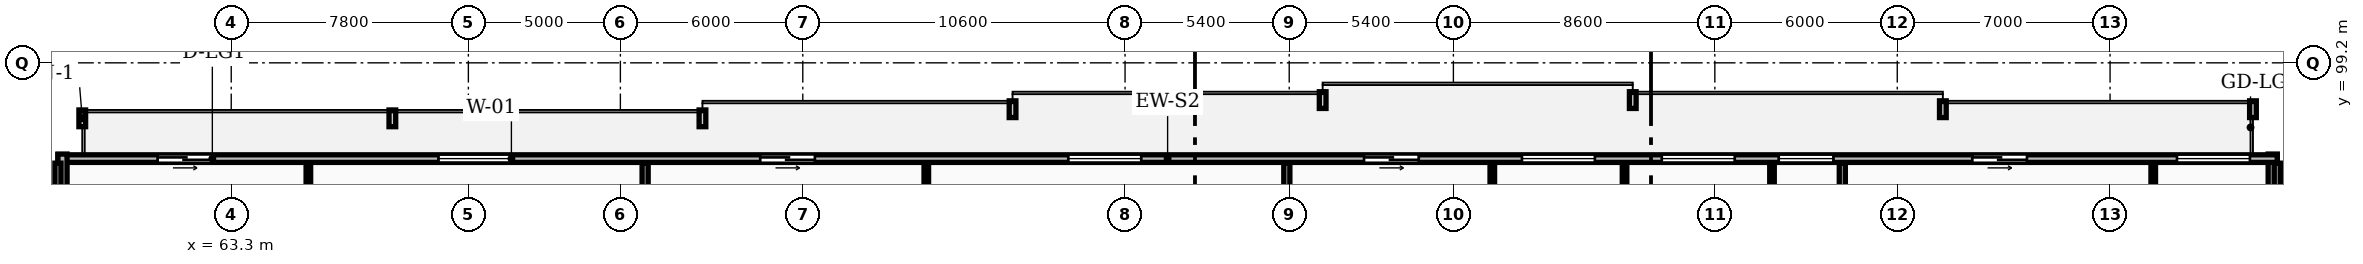
"""IFC4 building model, lengths in metres.
Left out: names, types, materials, properties, quantities, classifications, styles, units other than length and angle.
Written with IfcOpenShell. Run it as: python <this file> out.ifc"""

import sys

from ifc_helpers import new_model, si_unit, direction, frame, frame_2d, origin, place, context, subcontext, project, spatial, rectangle, extrude, element, fill, save


model = new_model("IFC4")
c1 = context("Model", 3, precision=1e-05, world=origin(), true_north=direction((0.0, 1.0)))
c2 = subcontext(c1, "Body", "Model", "MODEL_VIEW")
j1 = project(units=[si_unit("LENGTHUNIT", "METRE"), si_unit("PLANEANGLEUNIT", "RADIAN")], contexts=[c1])
p1 = place(None, origin())
s1 = spatial("IfcSite", under=j1, at=p1, CompositionType="ELEMENT")
p2 = place(p1, origin())
s2 = spatial("IfcBuilding", under=s1, at=p2, CompositionType="ELEMENT")
p3 = place(p2, frame((0.0, 0.0, 146.5)))
s3 = spatial("IfcBuildingStorey", under=s2, at=p3, CompositionType="ELEMENT", Elevation=146.5)
p4 = place(p3, frame((130.45, 92.6, 0.0), z_axis=(0.0, 0.0, 1.0), x_axis=(0.0, 1.0, 0.0)))
e1 = element("IfcWall", 1, at=p4, inside=s3, PredefinedType="STANDARD", context=c2, shape_type="SweptSolid", body=[
    extrude(rectangle(XDim=3.6, YDim=0.3, at=frame_2d((1.8, 0.0))), origin(), (0.0, 0.0, 1.0), 3.31),
])
p5 = place(p3, frame((130.6, 96.05, 0.0), z_axis=(0.0, 0.0, 1.0), x_axis=(-1.0, 0.0, 0.0)))
e2 = element("IfcWall", 2, at=p5, inside=s3, PredefinedType="STANDARD", context=c2, shape_type="SweptSolid", body=[
    extrude(rectangle(XDim=73.0, YDim=0.25, at=frame_2d((36.5, 0.0))), origin(), (0.0, 0.0, 1.0), 3.31),
])
p6 = place(p5, frame((67.921, 0.0, 0.0)))
e3 = element("IfcOpeningElement", 3, at=p6, cuts=e2, PredefinedType="OPENING", context=c2, shape_type="SweptSolid", body=[
    extrude(rectangle(XDim=1.8, YDim=2.2, at=frame_2d((0.9, 1.1))), frame((0.0, 0.135, 0.0), z_axis=(0.0, -1.0, 0.0), x_axis=(1.0, 0.0, 0.0)), (0.0, 0.0, 1.0), 0.27),
])
p7 = place(p5, frame((58.084, 0.0, 0.85)))
e4 = element("IfcOpeningElement", 4, at=p7, cuts=e2, PredefinedType="OPENING", context=c2, shape_type="SweptSolid", body=[
    extrude(rectangle(XDim=2.4, YDim=1.9, at=frame_2d((1.2, 0.95))), frame((0.0, 0.135, 0.0), z_axis=(0.0, -1.0, 0.0), x_axis=(1.0, 0.0, 0.0)), (0.0, 0.0, 1.0), 0.27),
])
p8 = place(p5, frame((48.101, 0.0, 0.0)))
e5 = element("IfcOpeningElement", 5, at=p8, cuts=e2, PredefinedType="OPENING", context=c2, shape_type="SweptSolid", body=[
    extrude(rectangle(XDim=1.8, YDim=2.2, at=frame_2d((0.9, 1.1))), frame((0.0, 0.135, 0.0), z_axis=(0.0, -1.0, 0.0), x_axis=(1.0, 0.0, 0.0)), (0.0, 0.0, 1.0), 0.27),
])
p9 = place(p5, frame((37.368, 0.0, 0.85)))
e6 = element("IfcOpeningElement", 6, at=p9, cuts=e2, PredefinedType="OPENING", context=c2, shape_type="SweptSolid", body=[
    extrude(rectangle(XDim=2.4, YDim=1.9, at=frame_2d((1.2, 0.95))), frame((0.0, 0.135, 0.0), z_axis=(0.0, -1.0, 0.0), x_axis=(1.0, 0.0, 0.0)), (0.0, 0.0, 1.0), 0.27),
])
p10 = place(p5, frame((22.445, 0.0, 0.85)))
e7 = element("IfcOpeningElement", 7, at=p10, cuts=e2, PredefinedType="OPENING", context=c2, shape_type="SweptSolid", body=[
    extrude(rectangle(XDim=2.4, YDim=1.9, at=frame_2d((1.2, 0.95))), frame((0.0, 0.135, 0.0), z_axis=(0.0, -1.0, 0.0), x_axis=(1.0, 0.0, 0.0)), (0.0, 0.0, 1.0), 0.27),
])
p11 = place(p5, frame((17.845, 0.0, 0.85)))
e8 = element("IfcOpeningElement", 8, at=p11, cuts=e2, PredefinedType="OPENING", context=c2, shape_type="SweptSolid", body=[
    extrude(rectangle(XDim=2.4, YDim=1.9, at=frame_2d((1.2, 0.95))), frame((0.0, 0.135, 0.0), z_axis=(0.0, -1.0, 0.0), x_axis=(1.0, 0.0, 0.0)), (0.0, 0.0, 1.0), 0.27),
])
p12 = place(p5, frame((28.239, 0.0, 0.0)))
e9 = element("IfcOpeningElement", 9, at=p12, cuts=e2, PredefinedType="OPENING", context=c2, shape_type="SweptSolid", body=[
    extrude(rectangle(XDim=1.8, YDim=2.2, at=frame_2d((0.9, 1.1))), frame((0.0, 0.135, 0.0), z_axis=(0.0, -1.0, 0.0), x_axis=(1.0, 0.0, 0.0)), (0.0, 0.0, 1.0), 0.27),
])
p13 = place(p5, frame((14.599, 0.0, 0.85)))
e10 = element("IfcOpeningElement", 10, at=p13, cuts=e2, PredefinedType="OPENING", context=c2, shape_type="SweptSolid", body=[
    extrude(rectangle(XDim=1.8, YDim=1.8, at=frame_2d((0.9, 0.9))), frame((0.0, 0.135, 0.0), z_axis=(0.0, -1.0, 0.0), x_axis=(1.0, 0.0, 0.0)), (0.0, 0.0, 1.0), 0.27),
])
p14 = place(p5, frame((8.234, 0.0, 0.0)))
e11 = element("IfcOpeningElement", 11, at=p14, cuts=e2, PredefinedType="OPENING", context=c2, shape_type="SweptSolid", body=[
    extrude(rectangle(XDim=1.8, YDim=2.2, at=frame_2d((0.9, 1.1))), frame((0.0, 0.135, 0.0), z_axis=(0.0, -1.0, 0.0), x_axis=(1.0, 0.0, 0.0)), (0.0, 0.0, 1.0), 0.27),
])
p15 = place(p5, frame((0.9, 0.0, 0.85)))
e12 = element("IfcOpeningElement", 12, at=p15, cuts=e2, PredefinedType="OPENING", context=c2, shape_type="SweptSolid", body=[
    extrude(rectangle(XDim=2.4, YDim=1.9, at=frame_2d((1.2, 0.95))), frame((0.0, 0.135, 0.0), z_axis=(0.0, -1.0, 0.0), x_axis=(1.0, 0.0, 0.0)), (0.0, 0.0, 1.0), 0.27),
])
p16 = place(p3, frame((57.75, 96.2, 0.0), z_axis=(0.0, 0.0, 1.0), x_axis=(0.0, -1.0, 0.0)))
e13 = element("IfcWall", 13, at=p16, inside=s3, PredefinedType="STANDARD", context=c2, shape_type="SweptSolid", body=[
    extrude(rectangle(XDim=3.6, YDim=0.3, at=frame_2d((1.8, 0.0))), origin(), (0.0, 0.0, 1.0), 3.31),
])
for number, where, z_axis, x_axis in (
    (14, (57.6, 69.83, 0.0), (0.0, 0.0, 1.0), (0.0, 1.0, 0.0)),
    (15, (130.6, 69.83, 0.0), (0.0, 0.0, 1.0), (0.0, 1.0, 0.0)),
    (16, (76.914, 69.83, 0.0), (0.0, 0.0, 1.0), (0.0, 1.0, 0.0)),
):
    element("IfcWall", number, at=place(p3, frame(where, z_axis=z_axis, x_axis=x_axis)), inside=s3, PredefinedType="PARTITIONING", context=c2, shape_type="SweptSolid", body=[
        extrude(rectangle(XDim=26.07, YDim=0.2, at=frame_2d((13.035, 0.0))), origin(), (0.0, 0.0, 1.0), 3.31),
    ])
p17 = place(p3, frame((65.837, 91.08, 0.0), z_axis=(0.0, 0.0, 1.0), x_axis=(0.0, 1.0, 0.0)))
e17 = element("IfcWall", 17, at=p17, inside=s3, PredefinedType="PARTITIONING", context=c2, shape_type="SweptSolid", body=[
    extrude(rectangle(XDim=4.82, YDim=0.15, at=frame_2d((2.41, 0.0))), origin(), (0.0, 0.0, 1.0), 3.31),
])
p18 = place(p3, frame((98.021, 69.83, 0.0), z_axis=(0.0, 0.0, 1.0), x_axis=(0.0, 1.0, 0.0)))
e18 = element("IfcWall", 18, at=p18, inside=s3, PredefinedType="PARTITIONING", context=c2, shape_type="SweptSolid", body=[
    extrude(rectangle(XDim=26.07, YDim=0.2, at=frame_2d((13.035, 0.0))), origin(), (0.0, 0.0, 1.0), 3.31),
])
p19 = place(p3, frame((86.163, 91.08, 0.0), z_axis=(0.0, 0.0, 1.0), x_axis=(0.0, 1.0, 0.0)))
e19 = element("IfcWall", 19, at=p19, inside=s3, PredefinedType="PARTITIONING", context=c2, shape_type="SweptSolid", body=[
    extrude(rectangle(XDim=4.82, YDim=0.15, at=frame_2d((2.41, 0.0))), origin(), (0.0, 0.0, 1.0), 3.31),
])
p20 = place(p3, frame((116.293, 69.83, 0.0), z_axis=(0.0, 0.0, 1.0), x_axis=(0.0, 1.0, 0.0)))
e20 = element("IfcWall", 20, at=p20, inside=s3, PredefinedType="PARTITIONING", context=c2, shape_type="SweptSolid", body=[
    extrude(rectangle(XDim=26.07, YDim=0.2, at=frame_2d((13.035, 0.0))), origin(), (0.0, 0.0, 1.0), 3.31),
])
p21 = place(p3, frame((109.13, 91.08, 0.0), z_axis=(0.0, 0.0, 1.0), x_axis=(0.0, 1.0, 0.0)))
e21 = element("IfcWall", 21, at=p21, inside=s3, PredefinedType="PARTITIONING", context=c2, shape_type="SweptSolid", body=[
    extrude(rectangle(XDim=4.82, YDim=0.15, at=frame_2d((2.41, 0.0))), origin(), (0.0, 0.0, 1.0), 3.31),
])
p22 = place(p3, frame((104.78, 85.94, 0.0), z_axis=(0.0, 0.0, 1.0), x_axis=(0.0, 1.0, 0.0)))
e22 = element("IfcWall", 22, at=p22, inside=s3, PredefinedType="PARTITIONING", context=c2, shape_type="SweptSolid", body=[
    extrude(rectangle(XDim=9.96, YDim=0.15, at=frame_2d((4.98, 0.0))), origin(), (0.0, 0.0, 1.0), 3.31),
])
p23 = place(p22, frame((2.936, 0.0, 0.0)))
e23 = element("IfcOpeningElement", 23, at=p23, cuts=e22, PredefinedType="OPENING", context=c2, shape_type="SweptSolid", body=[
    extrude(rectangle(XDim=0.92, YDim=2.08, at=frame_2d((0.46, 1.04))), frame((0.0, 0.085, 0.0), z_axis=(0.0, -1.0, 0.0), x_axis=(1.0, 0.0, 0.0)), (0.0, 0.0, 1.0), 0.17),
])
p24 = place(p3, frame((113.98, 88.67, 0.0), z_axis=(0.0, 0.0, 1.0), x_axis=(0.0, 1.0, 0.0)))
e24 = element("IfcWall", 24, at=p24, inside=s3, PredefinedType="PARTITIONING", context=c2, shape_type="SweptSolid", body=[
    extrude(rectangle(XDim=7.23, YDim=0.15, at=frame_2d((3.615, 0.0))), origin(), (0.0, 0.0, 1.0), 3.31),
])
p25 = place(p24, frame((0.26, 0.0, 0.0)))
e25 = element("IfcOpeningElement", 25, at=p25, cuts=e24, PredefinedType="OPENING", context=c2, shape_type="SweptSolid", body=[
    extrude(rectangle(XDim=0.92, YDim=2.08, at=frame_2d((0.46, 1.04))), frame((0.0, 0.085, 0.0), z_axis=(0.0, -1.0, 0.0), x_axis=(1.0, 0.0, 0.0)), (0.0, 0.0, 1.0), 0.17),
])
p26 = place(p3, frame((126.52, 85.94, 0.0), z_axis=(0.0, 0.0, 1.0), x_axis=(0.0, 1.0, 0.0)))
e26 = element("IfcWall", 26, at=p26, inside=s3, PredefinedType="PARTITIONING", context=c2, shape_type="SweptSolid", body=[
    extrude(rectangle(XDim=9.96, YDim=0.15, at=frame_2d((4.98, 0.0))), origin(), (0.0, 0.0, 1.0), 3.31),
])
p27 = place(p26, frame((1.43, 0.0, 0.0)))
e27 = element("IfcOpeningElement", 27, at=p27, cuts=e26, PredefinedType="OPENING", context=c2, shape_type="SweptSolid", body=[
    extrude(rectangle(XDim=0.84, YDim=2.04, at=frame_2d((0.42, 1.02))), frame((0.0, 0.085, 0.0), z_axis=(0.0, -1.0, 0.0), x_axis=(1.0, 0.0, 0.0)), (0.0, 0.0, 1.0), 0.17),
])
p28 = place(p26, frame((3.002, 0.0, 0.0)))
e28 = element("IfcOpeningElement", 28, at=p28, cuts=e26, PredefinedType="OPENING", context=c2, shape_type="SweptSolid", body=[
    extrude(rectangle(XDim=0.84, YDim=2.04, at=frame_2d((0.42, 1.02))), frame((0.0, 0.085, 0.0), z_axis=(0.0, -1.0, 0.0), x_axis=(1.0, 0.0, 0.0)), (0.0, 0.0, 1.0), 0.17),
])
p29 = place(p26, frame((6.669, 0.0, 0.0)))
e29 = element("IfcOpeningElement", 29, at=p29, cuts=e26, PredefinedType="OPENING", context=c2, shape_type="SweptSolid", body=[
    extrude(rectangle(XDim=0.88, YDim=2.06, at=frame_2d((0.44, 1.03))), frame((0.0, 0.085, 0.0), z_axis=(0.0, -1.0, 0.0), x_axis=(1.0, 0.0, 0.0)), (0.0, 0.0, 1.0), 0.17),
])
p30 = place(p6, origin())
e30 = element("IfcDoor", 30, at=p30, inside=s3, OperationType="SLIDING_TO_LEFT", PredefinedType="DOOR", context=c2, shape_type="SweptSolid", body=[
    extrude(rectangle(XDim=1.8, YDim=2.2, at=frame_2d((0.9, 1.1))), frame((0.0, 0.025, 0.0), z_axis=(0.0, -1.0, 0.0), x_axis=(1.0, 0.0, 0.0)), (0.0, 0.0, 1.0), 0.05),
])
fill(e3, e30)
p31 = place(p7, origin())
e31 = element("IfcWindow", 31, at=p31, inside=s3, PartitioningType="DOUBLE_PANEL_VERTICAL", PredefinedType="WINDOW", context=c2, shape_type="SweptSolid", body=[
    extrude(rectangle(XDim=2.4, YDim=1.9, at=frame_2d((1.2, 0.95))), frame((0.0, 0.03, 0.0), z_axis=(0.0, -1.0, 0.0), x_axis=(1.0, 0.0, 0.0)), (0.0, 0.0, 1.0), 0.06),
])
fill(e4, e31)
p32 = place(p8, origin())
e32 = element("IfcDoor", 32, at=p32, inside=s3, OperationType="SLIDING_TO_LEFT", PredefinedType="DOOR", context=c2, shape_type="SweptSolid", body=[
    extrude(rectangle(XDim=1.8, YDim=2.2, at=frame_2d((0.9, 1.1))), frame((0.0, 0.025, 0.0), z_axis=(0.0, -1.0, 0.0), x_axis=(1.0, 0.0, 0.0)), (0.0, 0.0, 1.0), 0.05),
])
fill(e5, e32)
p33 = place(p9, origin())
e33 = element("IfcWindow", 33, at=p33, inside=s3, PartitioningType="DOUBLE_PANEL_VERTICAL", PredefinedType="WINDOW", context=c2, shape_type="SweptSolid", body=[
    extrude(rectangle(XDim=2.4, YDim=1.9, at=frame_2d((1.2, 0.95))), frame((0.0, 0.03, 0.0), z_axis=(0.0, -1.0, 0.0), x_axis=(1.0, 0.0, 0.0)), (0.0, 0.0, 1.0), 0.06),
])
fill(e6, e33)
p34 = place(p10, origin())
e34 = element("IfcWindow", 34, at=p34, inside=s3, PartitioningType="DOUBLE_PANEL_VERTICAL", PredefinedType="WINDOW", context=c2, shape_type="SweptSolid", body=[
    extrude(rectangle(XDim=2.4, YDim=1.9, at=frame_2d((1.2, 0.95))), frame((0.0, 0.03, 0.0), z_axis=(0.0, -1.0, 0.0), x_axis=(1.0, 0.0, 0.0)), (0.0, 0.0, 1.0), 0.06),
])
fill(e7, e34)
p35 = place(p11, origin())
e35 = element("IfcWindow", 35, at=p35, inside=s3, PartitioningType="DOUBLE_PANEL_VERTICAL", PredefinedType="WINDOW", context=c2, shape_type="SweptSolid", body=[
    extrude(rectangle(XDim=2.4, YDim=1.9, at=frame_2d((1.2, 0.95))), frame((0.0, 0.03, 0.0), z_axis=(0.0, -1.0, 0.0), x_axis=(1.0, 0.0, 0.0)), (0.0, 0.0, 1.0), 0.06),
])
fill(e8, e35)
p36 = place(p12, origin())
e36 = element("IfcDoor", 36, at=p36, inside=s3, OperationType="SLIDING_TO_LEFT", PredefinedType="DOOR", context=c2, shape_type="SweptSolid", body=[
    extrude(rectangle(XDim=1.8, YDim=2.2, at=frame_2d((0.9, 1.1))), frame((0.0, 0.025, 0.0), z_axis=(0.0, -1.0, 0.0), x_axis=(1.0, 0.0, 0.0)), (0.0, 0.0, 1.0), 0.05),
])
fill(e9, e36)
p37 = place(p13, origin())
e37 = element("IfcWindow", 37, at=p37, inside=s3, PartitioningType="SINGLE_PANEL", PredefinedType="WINDOW", context=c2, shape_type="SweptSolid", body=[
    extrude(rectangle(XDim=1.8, YDim=1.8, at=frame_2d((0.9, 0.9))), frame((0.0, 0.03, 0.0), z_axis=(0.0, -1.0, 0.0), x_axis=(1.0, 0.0, 0.0)), (0.0, 0.0, 1.0), 0.06),
])
fill(e10, e37)
p38 = place(p14, origin())
e38 = element("IfcDoor", 38, at=p38, inside=s3, OperationType="SLIDING_TO_LEFT", PredefinedType="DOOR", context=c2, shape_type="SweptSolid", body=[
    extrude(rectangle(XDim=1.8, YDim=2.2, at=frame_2d((0.9, 1.1))), frame((0.0, 0.025, 0.0), z_axis=(0.0, -1.0, 0.0), x_axis=(1.0, 0.0, 0.0)), (0.0, 0.0, 1.0), 0.05),
])
fill(e11, e38)
p39 = place(p15, origin())
e39 = element("IfcWindow", 39, at=p39, inside=s3, PartitioningType="DOUBLE_PANEL_VERTICAL", PredefinedType="WINDOW", context=c2, shape_type="SweptSolid", body=[
    extrude(rectangle(XDim=2.4, YDim=1.9, at=frame_2d((1.2, 0.95))), frame((0.0, 0.03, 0.0), z_axis=(0.0, -1.0, 0.0), x_axis=(1.0, 0.0, 0.0)), (0.0, 0.0, 1.0), 0.06),
])
fill(e12, e39)
save(model, sys.argv[1])
